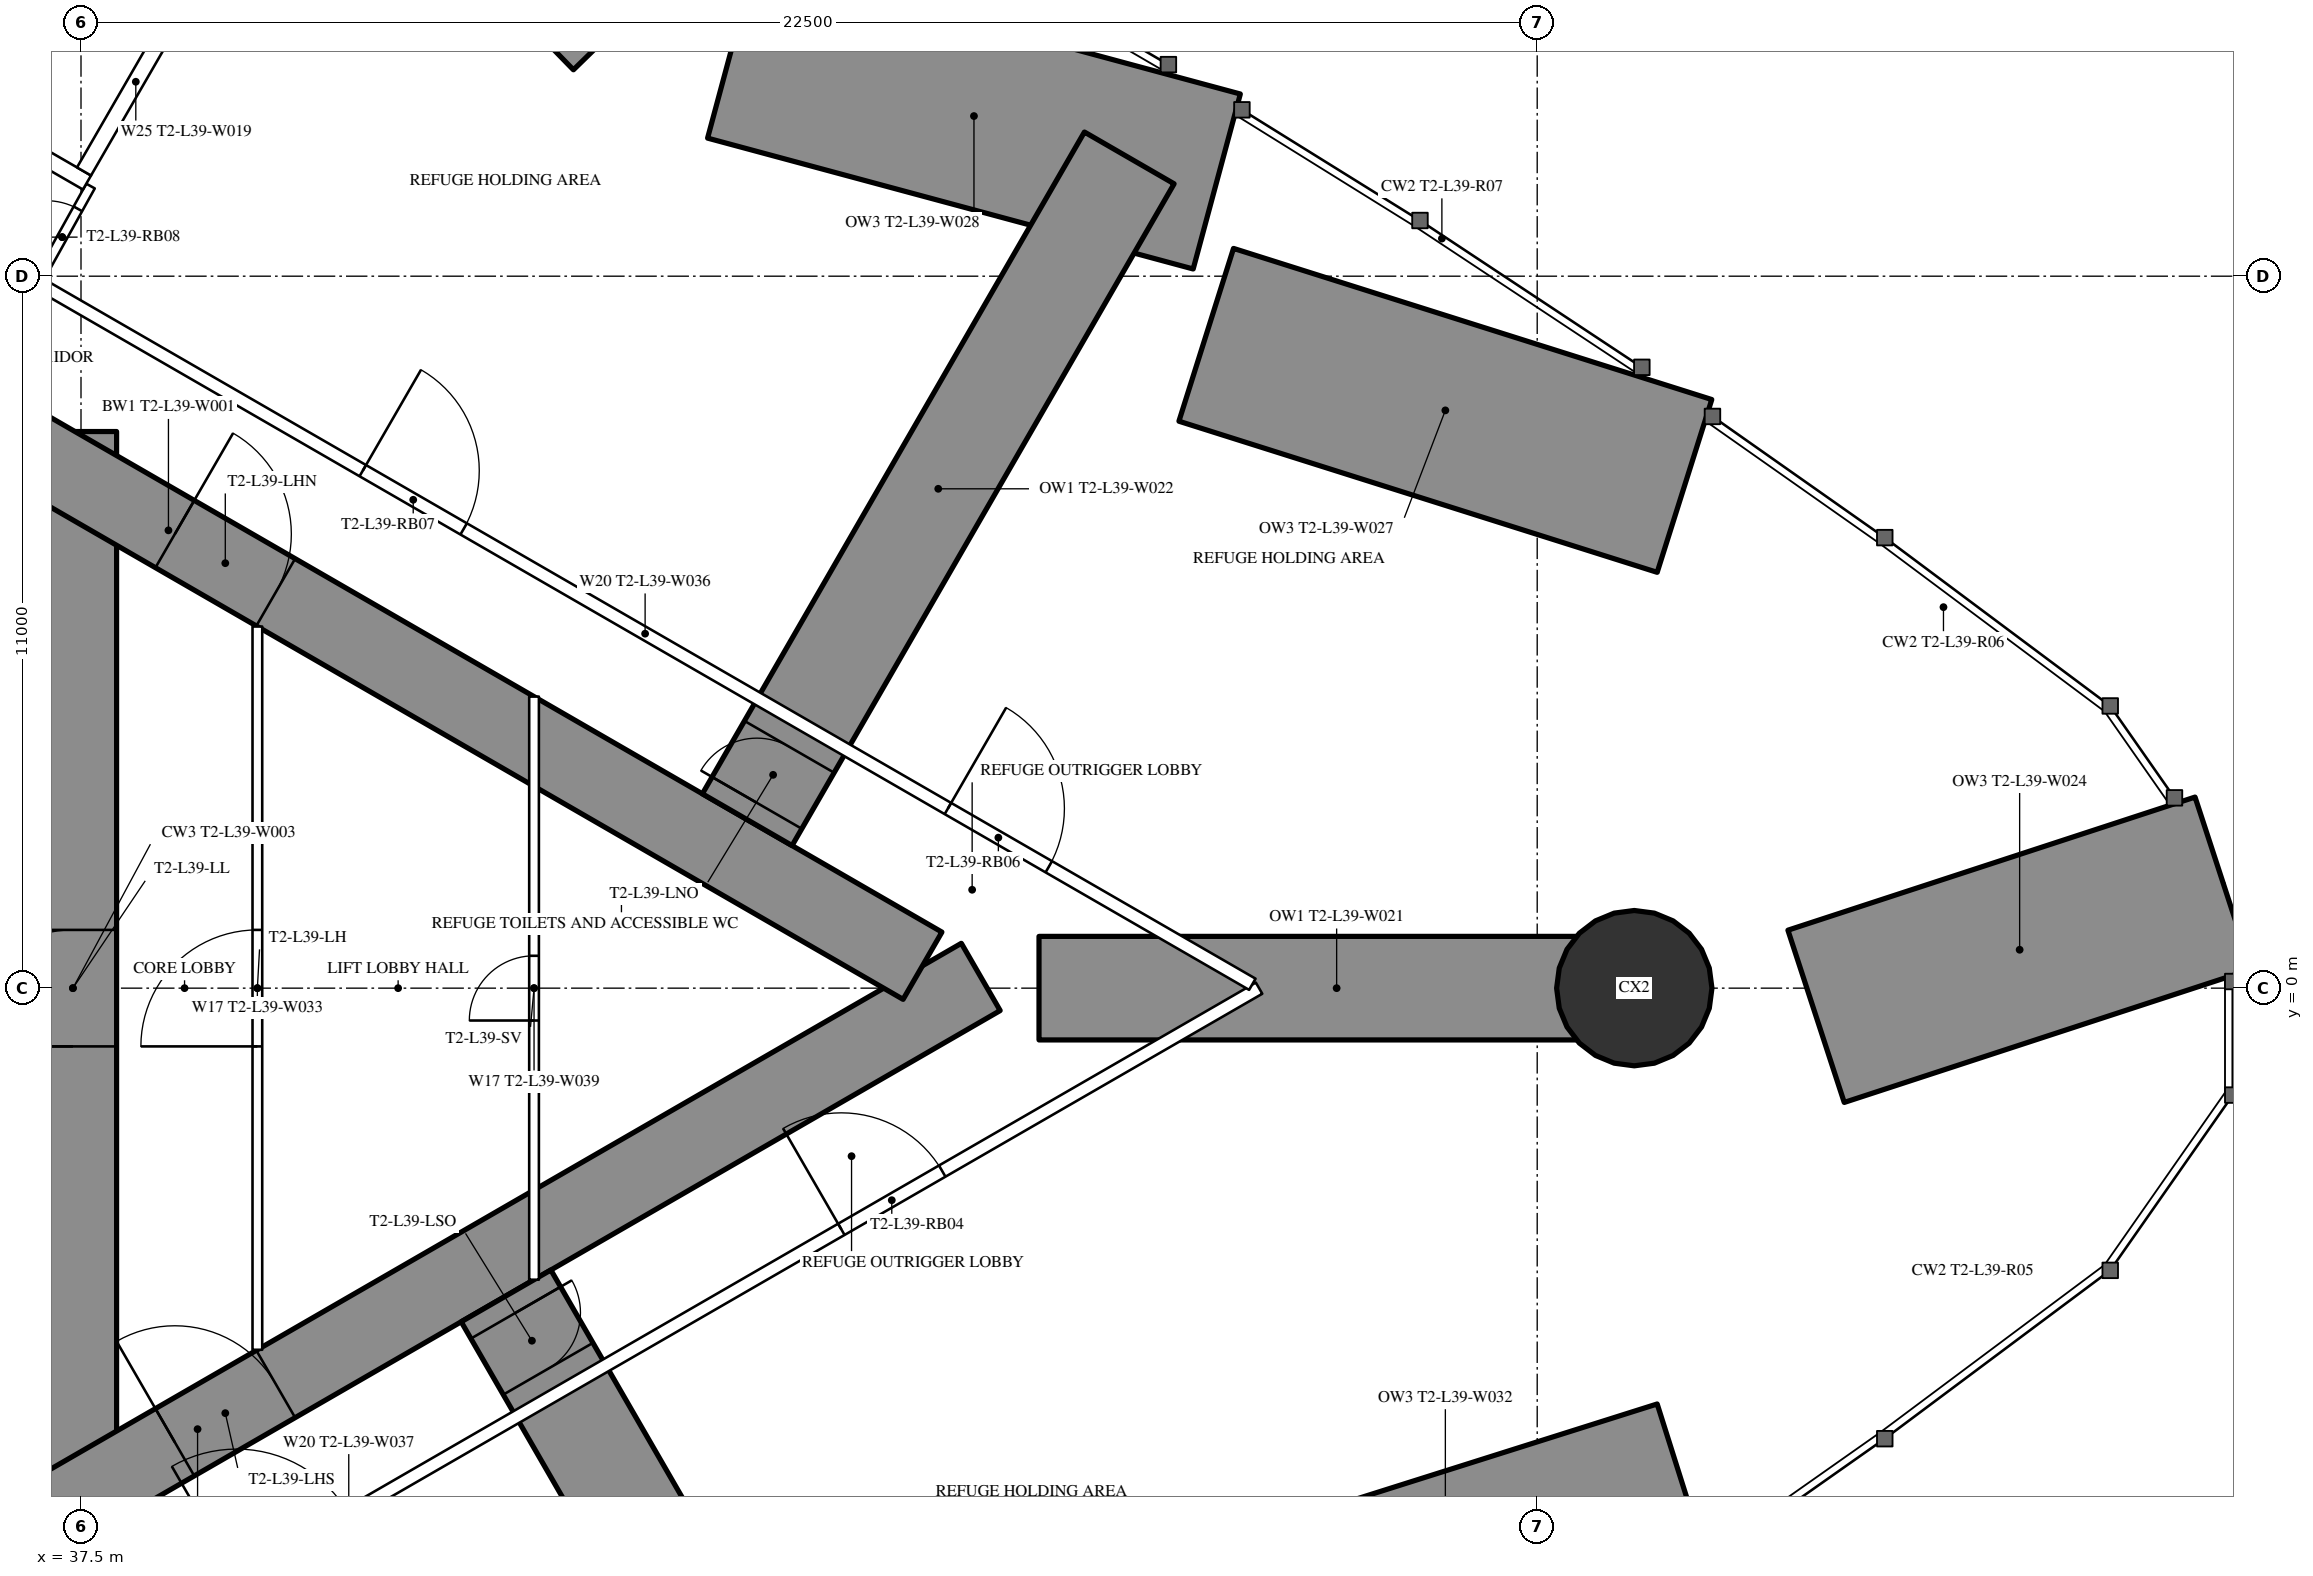
"""IFC4 building model, lengths in metres.
Left out: names, types, materials, properties, quantities, classifications, styles, units other than length and angle.
Written with IfcOpenShell. Run it as: python <this file> out.ifc"""

import sys

from ifc_helpers import new_model, si_unit, direction, frame, frame_2d, origin, origin_2d, place, context, subcontext, project, spatial, rectangle, circle, extrude, element, fill, save


model = new_model("IFC4")
c1 = context("Model", 3, precision=1e-05, world=origin(), true_north=direction((0.0, 1.0)))
c2 = subcontext(c1, "Body", "Model", "MODEL_VIEW")
j1 = project(units=[si_unit("LENGTHUNIT", "METRE"), si_unit("PLANEANGLEUNIT", "RADIAN")], contexts=[c1])
p1 = place(None, origin())
s1 = spatial("IfcSite", under=j1, at=p1, CompositionType="ELEMENT")
p2 = place(p1, origin())
s2 = spatial("IfcBuilding", under=s1, at=p2, CompositionType="ELEMENT")
p3 = place(p2, frame((0.0, 0.0, 146.7)))
s3 = spatial("IfcBuildingStorey", under=s2, at=p3, CompositionType="ELEMENT", Elevation=146.7)
p4 = place(p3, frame((70.6, 1.622, 0.0), z_axis=(0.0, 0.0, 1.0), x_axis=(-0.95049343947, -0.31074462429, 0.0)))
e1 = element("IfcWall", 1, at=p4, inside=s3, PredefinedType="SHEAR", context=c2, shape_type="SweptSolid", body=[
    extrude(rectangle(XDim=6.618, YDim=2.8, at=frame_2d((3.309, 0.0))), origin(), (0.0, 0.0, 1.0), 6.0),
])
p5 = place(p3, frame((62.276, 7.76, 0.0), z_axis=(0.0, 0.0, 1.0), x_axis=(-0.953540281048, 0.30126555133, 0.0)))
e2 = element("IfcWall", 2, at=p5, inside=s3, PredefinedType="SHEAR", context=c2, shape_type="SweptSolid", body=[
    extrude(rectangle(XDim=7.75, YDim=2.8, at=frame_2d((3.875, 0.0))), origin(), (0.0, 0.0, 1.0), 6.0),
])
p6 = place(p3, frame((55.049, 12.463, 0.0), z_axis=(0.0, 0.0, 1.0), x_axis=(-0.965562653174, 0.260170641686, 0.0)))
e3 = element("IfcWall", 3, at=p6, inside=s3, PredefinedType="SHEAR", context=c2, shape_type="SweptSolid", body=[
    extrude(rectangle(XDim=7.771, YDim=2.8, at=frame_2d((3.885, 0.0))), origin(), (0.0, 0.0, 1.0), 6.0),
])
p7 = place(p3, frame((41.389, 20.01, 0.0), z_axis=(0.0, 0.0, 1.0), x_axis=(0.698062666637, -0.716036670463, 0.0)))
e4 = element("IfcWall", 4, at=p7, inside=s3, PredefinedType="SHEAR", context=c2, shape_type="SweptSolid", body=[
    extrude(rectangle(XDim=6.764, YDim=2.8, at=frame_2d((3.382, 0.0))), origin(), (0.0, 0.0, 1.0), 6.0),
])
p8 = place(p3, frame((62.276, -7.76, 0.0), z_axis=(0.0, 0.0, 1.0), x_axis=(-0.953540281048, -0.30126555133, 0.0)))
e5 = element("IfcWall", 5, at=p8, inside=s3, PredefinedType="SHEAR", context=c2, shape_type="SweptSolid", body=[
    extrude(rectangle(XDim=7.75, YDim=2.8, at=frame_2d((3.875, 0.0))), origin(), (0.0, 0.0, 1.0), 6.0),
])
p9 = place(p3, frame((61.5, 0.0, 0.0), z_axis=(0.0, 0.0, 1.0), x_axis=(1.0, 0.0, 0.0)))
e6 = element("IfcColumn", 6, at=p9, inside=s3, PredefinedType="COLUMN", context=c2, shape_type="SweptSolid", body=[
    extrude(circle(Radius=1.2, at=origin_2d()), origin(), (0.0, 0.0, 1.0), 6.0),
])
p10 = place(p3, frame((37.375, -8.6, 0.0), z_axis=(0.0, 0.0, 1.0), x_axis=(0.0, 1.0, 0.0)))
e7 = element("IfcWall", 7, at=p10, inside=s3, PredefinedType="SHEAR", context=c2, shape_type="SweptSolid", body=[
    extrude(rectangle(XDim=17.2, YDim=1.35, at=frame_2d((8.6, 0.0))), origin(), (0.0, 0.0, 1.0), 6.0),
])
p11 = place(p10, frame((7.7, 0.0, 0.0)))
e8 = element("IfcOpeningElement", 8, at=p11, cuts=e7, PredefinedType="OPENING", context=c2, shape_type="SweptSolid", body=[
    extrude(rectangle(XDim=1.8, YDim=2.2, at=frame_2d((0.9, 1.1))), frame((0.0, 0.685, 0.0), z_axis=(0.0, -1.0, 0.0), x_axis=(1.0, 0.0, 0.0)), (0.0, 0.0, 1.0), 1.37),
])
p12 = place(p3, frame((27.2, -13.8, 0.0), z_axis=(0.0, 0.0, 1.0), x_axis=(0.866027159892, 0.499996958321, 0.0)))
e9 = element("IfcWall", 9, at=p12, inside=s3, PredefinedType="SHEAR", context=c2, shape_type="SweptSolid", body=[
    extrude(rectangle(XDim=27.947, YDim=1.2, at=frame_2d((13.973, 0.0))), origin(), (0.0, 0.0, 1.0), 6.0),
])
p13 = place(p12, frame((4.6, 0.0, 0.0)))
e10 = element("IfcOpeningElement", 10, at=p13, cuts=e9, PredefinedType="OPENING", context=c2, shape_type="SweptSolid", body=[
    extrude(rectangle(XDim=1.0, YDim=2.2, at=frame_2d((0.5, 1.1))), frame((0.0, 0.61, 0.0), z_axis=(0.0, -1.0, 0.0), x_axis=(1.0, 0.0, 0.0)), (0.0, 0.0, 1.0), 1.22),
])
p14 = place(p12, frame((13.568, 0.0, 0.0)))
e11 = element("IfcOpeningElement", 11, at=p14, cuts=e9, PredefinedType="OPENING", context=c2, shape_type="SweptSolid", body=[
    extrude(rectangle(XDim=1.8, YDim=2.2, at=frame_2d((0.9, 1.1))), frame((0.0, 0.61, 0.0), z_axis=(0.0, -1.0, 0.0), x_axis=(1.0, 0.0, 0.0)), (0.0, 0.0, 1.0), 1.22),
])
p15 = place(p3, frame((27.2, 13.8, 0.0), z_axis=(0.0, 0.0, 1.0), x_axis=(0.866024515034, -0.500001539357, 0.0)))
e12 = element("IfcWall", 12, at=p15, inside=s3, PredefinedType="SHEAR", context=c2, shape_type="SweptSolid", body=[
    extrude(rectangle(XDim=26.907, YDim=1.2, at=frame_2d((13.454, 0.0))), origin(), (0.0, 0.0, 1.0), 6.0),
])
p16 = place(p15, frame((4.6, 0.0, 0.0)))
e13 = element("IfcOpeningElement", 13, at=p16, cuts=e12, PredefinedType="OPENING", context=c2, shape_type="SweptSolid", body=[
    extrude(rectangle(XDim=1.0, YDim=2.2, at=frame_2d((0.5, 1.1))), frame((0.0, 0.61, 0.0), z_axis=(0.0, -1.0, 0.0), x_axis=(1.0, 0.0, 0.0)), (0.0, 0.0, 1.0), 1.22),
])
p17 = place(p15, frame((13.568, 0.0, 0.0)))
e14 = element("IfcOpeningElement", 14, at=p17, cuts=e12, PredefinedType="OPENING", context=c2, shape_type="SweptSolid", body=[
    extrude(rectangle(XDim=1.8, YDim=2.2, at=frame_2d((0.9, 1.1))), frame((0.0, 0.61, 0.0), z_axis=(0.0, -1.0, 0.0), x_axis=(1.0, 0.0, 0.0)), (0.0, 0.0, 1.0), 1.22),
])
p18 = place(p3, frame((44.067, -4.754, 0.0), z_axis=(0.0, 0.0, 1.0), x_axis=(0.499987574995, -0.866032577246, 0.0)))
e15 = element("IfcWall", 15, at=p18, inside=s3, PredefinedType="SHEAR", context=c2, shape_type="SweptSolid", body=[
    extrude(rectangle(XDim=11.824, YDim=1.6, at=frame_2d((5.912, 0.0))), origin(), (0.0, 0.0, 1.0), 6.0),
])
p19 = place(p18, frame((0.3, 0.0, 0.0)))
e16 = element("IfcOpeningElement", 16, at=p19, cuts=e15, PredefinedType="OPENING", context=c2, shape_type="SweptSolid", body=[
    extrude(rectangle(XDim=1.0, YDim=2.2, at=frame_2d((0.5, 1.1))), frame((0.0, 0.81, 0.0), z_axis=(0.0, -1.0, 0.0), x_axis=(1.0, 0.0, 0.0)), (0.0, 0.0, 1.0), 1.62),
])
p20 = place(p3, frame((52.302, 0.0, 0.0), z_axis=(0.0, 0.0, 1.0), x_axis=(1.0, 0.0, 0.0)))
e17 = element("IfcWall", 17, at=p20, inside=s3, PredefinedType="SHEAR", context=c2, shape_type="SweptSolid", body=[
    extrude(rectangle(XDim=9.198, YDim=1.6, at=frame_2d((4.599, 0.0))), origin(), (0.0, 0.0, 1.0), 6.0),
])
p21 = place(p3, frame((47.794, 2.603, 0.0), z_axis=(0.0, 0.0, 1.0), x_axis=(0.499993342329, 0.866029247559, 0.0)))
e18 = element("IfcWall", 18, at=p21, inside=s3, PredefinedType="SHEAR", context=c2, shape_type="SweptSolid", body=[
    extrude(rectangle(XDim=11.806, YDim=1.6, at=frame_2d((5.903, 0.0))), origin(), (0.0, 0.0, 1.0), 6.0),
])
p22 = place(p21, frame((0.3, 0.0, 0.0)))
e19 = element("IfcOpeningElement", 19, at=p22, cuts=e18, PredefinedType="OPENING", context=c2, shape_type="SweptSolid", body=[
    extrude(rectangle(XDim=1.0, YDim=2.2, at=frame_2d((0.5, 1.1))), frame((0.0, 0.81, 0.0), z_axis=(0.0, -1.0, 0.0), x_axis=(1.0, 0.0, 0.0)), (0.0, 0.0, 1.0), 1.62),
])
p23 = place(p3, frame((27.572, -16.241, 0.0), z_axis=(0.0, 0.0, 1.0), x_axis=(0.86602499815, 0.500000702579, 0.0)))
e20 = element("IfcWall", 20, at=p23, inside=s3, PredefinedType="PARTITIONING", context=c2, shape_type="SweptSolid", body=[
    extrude(rectangle(XDim=32.482, YDim=0.2, at=frame_2d((16.241, 0.0))), origin(), (0.0, 0.0, 1.0), 5.75),
])
p24 = place(p23, frame((4.875, 0.0, 0.0)))
e21 = element("IfcOpeningElement", 21, at=p24, cuts=e20, PredefinedType="OPENING", context=c2, shape_type="SweptSolid", body=[
    extrude(rectangle(XDim=1.8, YDim=2.2, at=frame_2d((0.9, 1.1))), frame((0.0, 0.11, 0.0), z_axis=(0.0, -1.0, 0.0), x_axis=(1.0, 0.0, 0.0)), (0.0, 0.0, 1.0), 0.22),
])
p25 = place(p23, frame((14.24, 0.0, 0.0)))
e22 = element("IfcOpeningElement", 22, at=p25, cuts=e20, PredefinedType="OPENING", context=c2, shape_type="SweptSolid", body=[
    extrude(rectangle(XDim=2.0, YDim=2.4, at=frame_2d((1.0, 1.2))), frame((0.0, 0.11, 0.0), z_axis=(0.0, -1.0, 0.0), x_axis=(1.0, 0.0, 0.0)), (0.0, 0.0, 1.0), 0.22),
])
p26 = place(p23, frame((25.029, 0.0, 0.0)))
e23 = element("IfcOpeningElement", 23, at=p26, cuts=e20, PredefinedType="OPENING", context=c2, shape_type="SweptSolid", body=[
    extrude(rectangle(XDim=1.8, YDim=2.2, at=frame_2d((0.9, 1.1))), frame((0.0, 0.11, 0.0), z_axis=(0.0, -1.0, 0.0), x_axis=(1.0, 0.0, 0.0)), (0.0, 0.0, 1.0), 0.22),
])
p27 = place(p3, frame((36.834, 10.894, 0.0), z_axis=(0.0, 0.0, 1.0), x_axis=(0.866028157229, -0.499995230863, 0.0)))
e24 = element("IfcWall", 24, at=p27, inside=s3, PredefinedType="PARTITIONING", context=c2, shape_type="SweptSolid", body=[
    extrude(rectangle(XDim=21.667, YDim=0.2, at=frame_2d((10.833, 0.0))), origin(), (0.0, 0.0, 1.0), 5.75),
])
p28 = place(p27, frame((16.236, 0.0, 0.0)))
e25 = element("IfcOpeningElement", 25, at=p28, cuts=e24, PredefinedType="OPENING", context=c2, shape_type="SweptSolid", body=[
    extrude(rectangle(XDim=1.8, YDim=2.2, at=frame_2d((0.9, 1.1))), frame((0.0, 0.11, 0.0), z_axis=(0.0, -1.0, 0.0), x_axis=(1.0, 0.0, 0.0)), (0.0, 0.0, 1.0), 0.22),
])
p29 = place(p27, frame((5.796, 0.0, 0.0)))
e26 = element("IfcOpeningElement", 26, at=p29, cuts=e24, PredefinedType="OPENING", context=c2, shape_type="SweptSolid", body=[
    extrude(rectangle(XDim=1.8, YDim=2.2, at=frame_2d((0.9, 1.1))), frame((0.0, 0.11, 0.0), z_axis=(0.0, -1.0, 0.0), x_axis=(1.0, 0.0, 0.0)), (0.0, 0.0, 1.0), 0.22),
])
p30 = place(p3, frame((36.771, 10.814, 0.0), z_axis=(0.0, 0.0, 1.0), x_axis=(0.485585508183, 0.874189175317, 0.0)))
e27 = element("IfcWall", 27, at=p30, inside=s3, PredefinedType="PARTITIONING", context=c2, shape_type="SweptSolid", body=[
    extrude(rectangle(XDim=1.805, YDim=0.15, at=frame_2d((0.902, 0.0))), origin(), (0.0, 0.0, 1.0), 5.75),
])
p31 = place(p30, frame((0.403, 0.0, 0.0)))
e28 = element("IfcOpeningElement", 28, at=p31, cuts=e27, PredefinedType="OPENING", context=c2, shape_type="SweptSolid", body=[
    extrude(rectangle(XDim=1.0, YDim=2.2, at=frame_2d((0.5, 1.1))), frame((0.0, 0.085, 0.0), z_axis=(0.0, -1.0, 0.0), x_axis=(1.0, 0.0, 0.0)), (0.0, 0.0, 1.0), 0.17),
])
p32 = place(p3, frame((40.225, -5.587, 0.0), z_axis=(0.0, 0.0, 1.0), x_axis=(0.0, 1.0, 0.0)))
e29 = element("IfcWall", 29, at=p32, inside=s3, PredefinedType="PARTITIONING", context=c2, shape_type="SweptSolid", body=[
    extrude(rectangle(XDim=11.174, YDim=0.15, at=frame_2d((5.587, 0.0))), origin(), (0.0, 0.0, 1.0), 5.75),
])
p33 = place(p32, frame((4.687, 0.0, 0.0)))
e30 = element("IfcOpeningElement", 30, at=p33, cuts=e29, PredefinedType="OPENING", context=c2, shape_type="SweptSolid", body=[
    extrude(rectangle(XDim=1.8, YDim=2.2, at=frame_2d((0.9, 1.1))), frame((0.0, 0.085, 0.0), z_axis=(0.0, -1.0, 0.0), x_axis=(1.0, 0.0, 0.0)), (0.0, 0.0, 1.0), 0.17),
])
p34 = place(p3, frame((44.5, -4.505, 0.0), z_axis=(0.0, 0.0, 1.0), x_axis=(0.0, 1.0, 0.0)))
e31 = element("IfcWall", 31, at=p34, inside=s3, PredefinedType="PARTITIONING", context=c2, shape_type="SweptSolid", body=[
    extrude(rectangle(XDim=9.009, YDim=0.15, at=frame_2d((4.505, 0.0))), origin(), (0.0, 0.0, 1.0), 5.75),
])
p35 = place(p34, frame((4.005, 0.0, 0.0)))
e32 = element("IfcOpeningElement", 32, at=p35, cuts=e31, PredefinedType="OPENING", context=c2, shape_type="SweptSolid", body=[
    extrude(rectangle(XDim=1.0, YDim=2.2, at=frame_2d((0.5, 1.1))), frame((0.0, 0.085, 0.0), z_axis=(0.0, -1.0, 0.0), x_axis=(1.0, 0.0, 0.0)), (0.0, 0.0, 1.0), 0.17),
])
p36 = place(p3, frame((33.608, 14.747, 0.0), z_axis=(0.0, 0.0, 1.0), x_axis=(0.866043305498, -0.49996899204, 0.0)))
e33 = element("IfcWall", 33, at=p36, inside=s3, PredefinedType="PARTITIONING", context=c2, shape_type="SweptSolid", body=[
    extrude(rectangle(XDim=4.6, YDim=0.25, at=frame_2d((2.3, 0.0))), origin(), (0.0, 0.0, 1.0), 5.75),
])
p37 = place(p3, frame((37.547, 12.618, 0.0), z_axis=(0.0, 0.0, 1.0), x_axis=(0.499929347863, 0.866066190972, 0.0)))
e34 = element("IfcWall", 34, at=p37, inside=s3, PredefinedType="PARTITIONING", context=c2, shape_type="SweptSolid", body=[
    extrude(rectangle(XDim=3.201, YDim=0.25, at=frame_2d((1.6, 0.0))), origin(), (0.0, 0.0, 1.0), 5.75),
])
p38 = place(p19, origin())
e35 = element("IfcDoor", 35, at=p38, inside=s3, OperationType="SINGLE_SWING_LEFT", PredefinedType="DOOR", context=c2, shape_type="SweptSolid", body=[
    extrude(rectangle(XDim=1.0, YDim=2.2, at=frame_2d((0.5, 1.1))), frame((0.0, 0.025, 0.0), z_axis=(0.0, -1.0, 0.0), x_axis=(1.0, 0.0, 0.0)), (0.0, 0.0, 1.0), 0.05),
])
fill(e16, e35)
p39 = place(p22, origin())
e36 = element("IfcDoor", 36, at=p39, inside=s3, OperationType="SINGLE_SWING_LEFT", PredefinedType="DOOR", context=c2, shape_type="SweptSolid", body=[
    extrude(rectangle(XDim=1.0, YDim=2.2, at=frame_2d((0.5, 1.1))), frame((0.0, 0.025, 0.0), z_axis=(0.0, -1.0, 0.0), x_axis=(1.0, 0.0, 0.0)), (0.0, 0.0, 1.0), 0.05),
])
fill(e19, e36)
p40 = place(p26, origin())
e37 = element("IfcDoor", 37, at=p40, inside=s3, OperationType="DOUBLE_DOOR_SINGLE_SWING", PredefinedType="DOOR", context=c2, shape_type="SweptSolid", body=[
    extrude(rectangle(XDim=1.8, YDim=2.2, at=frame_2d((0.9, 1.1))), frame((0.0, 0.025, 0.0), z_axis=(0.0, -1.0, 0.0), x_axis=(1.0, 0.0, 0.0)), (0.0, 0.0, 1.0), 0.05),
])
fill(e23, e37)
p41 = place(p28, origin())
e38 = element("IfcDoor", 38, at=p41, inside=s3, OperationType="DOUBLE_DOOR_SINGLE_SWING", PredefinedType="DOOR", context=c2, shape_type="SweptSolid", body=[
    extrude(rectangle(XDim=1.8, YDim=2.2, at=frame_2d((0.9, 1.1))), frame((0.0, 0.025, 0.0), z_axis=(0.0, -1.0, 0.0), x_axis=(1.0, 0.0, 0.0)), (0.0, 0.0, 1.0), 0.05),
])
fill(e25, e38)
p42 = place(p29, origin())
e39 = element("IfcDoor", 39, at=p42, inside=s3, OperationType="DOUBLE_DOOR_SINGLE_SWING", PredefinedType="DOOR", context=c2, shape_type="SweptSolid", body=[
    extrude(rectangle(XDim=1.8, YDim=2.2, at=frame_2d((0.9, 1.1))), frame((0.0, 0.025, 0.0), z_axis=(0.0, -1.0, 0.0), x_axis=(1.0, 0.0, 0.0)), (0.0, 0.0, 1.0), 0.05),
])
fill(e26, e39)
p43 = place(p31, origin())
e40 = element("IfcDoor", 40, at=p43, inside=s3, OperationType="SINGLE_SWING_LEFT", PredefinedType="DOOR", context=c2, shape_type="SweptSolid", body=[
    extrude(rectangle(XDim=1.0, YDim=2.2, at=frame_2d((0.5, 1.1))), frame((0.0, 0.025, 0.0), z_axis=(0.0, -1.0, 0.0), x_axis=(1.0, 0.0, 0.0)), (0.0, 0.0, 1.0), 0.05),
])
fill(e28, e40)
p44 = place(p33, origin())
e41 = element("IfcDoor", 41, at=p44, inside=s3, OperationType="DOUBLE_DOOR_SINGLE_SWING", PredefinedType="DOOR", context=c2, shape_type="SweptSolid", body=[
    extrude(rectangle(XDim=1.8, YDim=2.2, at=frame_2d((0.9, 1.1))), frame((0.0, 0.025, 0.0), z_axis=(0.0, -1.0, 0.0), x_axis=(1.0, 0.0, 0.0)), (0.0, 0.0, 1.0), 0.05),
])
fill(e30, e41)
p45 = place(p35, origin())
e42 = element("IfcDoor", 42, at=p45, inside=s3, OperationType="SINGLE_SWING_LEFT", PredefinedType="DOOR", context=c2, shape_type="SweptSolid", body=[
    extrude(rectangle(XDim=1.0, YDim=2.2, at=frame_2d((0.5, 1.1))), frame((0.0, 0.025, 0.0), z_axis=(0.0, -1.0, 0.0), x_axis=(1.0, 0.0, 0.0)), (0.0, 0.0, 1.0), 0.05),
])
fill(e32, e42)
p46 = place(p14, origin())
e43 = element("IfcDoor", 43, at=p46, inside=s3, OperationType="DOUBLE_DOOR_SINGLE_SWING", PredefinedType="DOOR", context=c2, shape_type="SweptSolid", body=[
    extrude(rectangle(XDim=1.8, YDim=2.2, at=frame_2d((0.9, 1.1))), frame((0.0, 0.025, 0.0), z_axis=(0.0, -1.0, 0.0), x_axis=(1.0, 0.0, 0.0)), (0.0, 0.0, 1.0), 0.05),
])
fill(e11, e43)
p47 = place(p17, origin())
e44 = element("IfcDoor", 44, at=p47, inside=s3, OperationType="DOUBLE_DOOR_SINGLE_SWING", PredefinedType="DOOR", context=c2, shape_type="SweptSolid", body=[
    extrude(rectangle(XDim=1.8, YDim=2.2, at=frame_2d((0.9, 1.1))), frame((0.0, 0.025, 0.0), z_axis=(0.0, -1.0, 0.0), x_axis=(1.0, 0.0, 0.0)), (0.0, 0.0, 1.0), 0.05),
])
fill(e14, e44)
p48 = place(p11, origin())
e45 = element("IfcDoor", 45, at=p48, inside=s3, OperationType="DOUBLE_DOOR_SINGLE_SWING", PredefinedType="DOOR", context=c2, shape_type="SweptSolid", body=[
    extrude(rectangle(XDim=1.8, YDim=2.2, at=frame_2d((0.9, 1.1))), frame((0.0, 0.025, 0.0), z_axis=(0.0, -1.0, 0.0), x_axis=(1.0, 0.0, 0.0)), (0.0, 0.0, 1.0), 0.05),
])
fill(e8, e45)
save(model, sys.argv[1])
